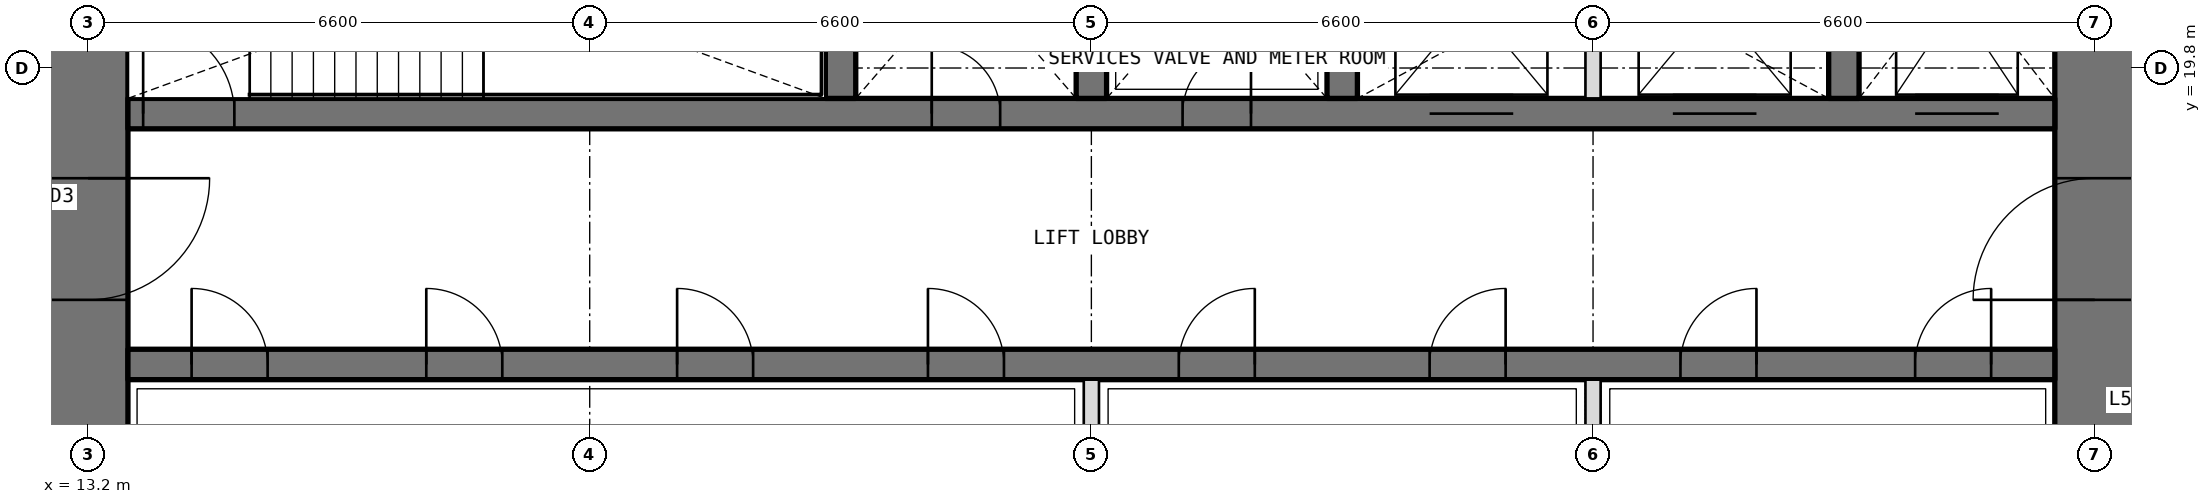
"""IFC4 building model, lengths in metres.
Left out: names, types, materials, properties, quantities, classifications, styles, units other than length and angle.
Written with IfcOpenShell. Run it as: python <this file> out.ifc"""

import sys

from ifc_helpers import new_model, si_unit, direction, frame, frame_2d, origin, place, context, subcontext, project, spatial, rectangle, extrude, element, fill, save


model = new_model("IFC4")
c1 = context("Model", 3, precision=1e-05, world=origin(), true_north=direction((0.0, 1.0)))
c2 = subcontext(c1, "Body", "Model", "MODEL_VIEW")
j1 = project(units=[si_unit("LENGTHUNIT", "METRE"), si_unit("PLANEANGLEUNIT", "RADIAN")], contexts=[c1])
p1 = place(None, origin())
s1 = spatial("IfcSite", under=j1, at=p1, CompositionType="ELEMENT")
p2 = place(p1, origin())
s2 = spatial("IfcBuilding", under=s1, at=p2, CompositionType="ELEMENT")
p3 = place(p2, frame((0.0, 0.0, 218.7)))
s3 = spatial("IfcBuildingStorey", under=s2, at=p3, CompositionType="ELEMENT", Elevation=218.7)
p4 = place(p3, frame((39.6, 13.725, 0.0), z_axis=(0.0, 0.0, 1.0), x_axis=(0.0, 1.0, 0.0)))
e1 = element("IfcWall", 1, at=p4, inside=s3, PredefinedType="SHEAR", context=c2, shape_type="SweptSolid", body=[
    extrude(rectangle(XDim=18.75, YDim=1.05, at=frame_2d((9.375, 0.0))), origin(), (0.0, 0.0, 1.0), 4.2),
])
p5 = place(p4, frame((3.025, 0.0, 0.0)))
e2 = element("IfcOpeningElement", 2, at=p5, cuts=e1, PredefinedType="OPENING", context=c2, shape_type="SweptSolid", body=[
    extrude(rectangle(XDim=1.6, YDim=2.1, at=frame_2d((0.8, 1.05))), frame((0.0, 0.535, 0.0), z_axis=(0.0, -1.0, 0.0), x_axis=(1.0, 0.0, 0.0)), (0.0, 0.0, 1.0), 1.07),
])
p6 = place(p4, frame((13.825, 0.0, 0.0)))
e3 = element("IfcOpeningElement", 3, at=p6, cuts=e1, PredefinedType="OPENING", context=c2, shape_type="SweptSolid", body=[
    extrude(rectangle(XDim=1.6, YDim=2.1, at=frame_2d((0.8, 1.05))), frame((0.0, 0.535, 0.0), z_axis=(0.0, -1.0, 0.0), x_axis=(1.0, 0.0, 0.0)), (0.0, 0.0, 1.0), 1.07),
])
p7 = place(p3, frame((13.2, 32.475, 0.0), z_axis=(0.0, 0.0, 1.0), x_axis=(0.0, -1.0, 0.0)))
e4 = element("IfcWall", 4, at=p7, inside=s3, PredefinedType="SHEAR", context=c2, shape_type="SweptSolid", body=[
    extrude(rectangle(XDim=18.75, YDim=1.05, at=frame_2d((9.375, 0.0))), origin(), (0.0, 0.0, 1.0), 4.2),
])
p8 = place(p7, frame((14.125, 0.0, 0.0)))
e5 = element("IfcOpeningElement", 5, at=p8, cuts=e4, PredefinedType="OPENING", context=c2, shape_type="SweptSolid", body=[
    extrude(rectangle(XDim=1.6, YDim=2.1, at=frame_2d((0.8, 1.05))), frame((0.0, 0.535, 0.0), z_axis=(0.0, -1.0, 0.0), x_axis=(1.0, 0.0, 0.0)), (0.0, 0.0, 1.0), 1.07),
])
p9 = place(p7, frame((3.325, 0.0, 0.0)))
e6 = element("IfcOpeningElement", 6, at=p9, cuts=e4, PredefinedType="OPENING", context=c2, shape_type="SweptSolid", body=[
    extrude(rectangle(XDim=1.6, YDim=2.1, at=frame_2d((0.8, 1.05))), frame((0.0, 0.535, 0.0), z_axis=(0.0, -1.0, 0.0), x_axis=(1.0, 0.0, 0.0)), (0.0, 0.0, 1.0), 1.07),
])
p10 = place(p3, frame((13.725, 15.9, 0.0), z_axis=(0.0, 0.0, 1.0), x_axis=(1.0, 0.0, 0.0)))
e7 = element("IfcWall", 7, at=p10, inside=s3, PredefinedType="SHEAR", context=c2, shape_type="SweptSolid", body=[
    extrude(rectangle(XDim=25.35, YDim=0.4, at=frame_2d((12.675, 0.0))), origin(), (0.0, 0.0, 1.0), 4.2),
])
p11 = place(p10, frame((0.837, 0.0, 0.0)))
e8 = element("IfcOpeningElement", 8, at=p11, cuts=e7, PredefinedType="OPENING", context=c2, shape_type="SweptSolid", body=[
    extrude(rectangle(XDim=1.0, YDim=2.1, at=frame_2d((0.5, 1.05))), frame((0.0, 0.21, 0.0), z_axis=(0.0, -1.0, 0.0), x_axis=(1.0, 0.0, 0.0)), (0.0, 0.0, 1.0), 0.42),
])
p12 = place(p10, frame((3.925, 0.0, 0.0)))
e9 = element("IfcOpeningElement", 9, at=p12, cuts=e7, PredefinedType="OPENING", context=c2, shape_type="SweptSolid", body=[
    extrude(rectangle(XDim=1.0, YDim=2.1, at=frame_2d((0.5, 1.05))), frame((0.0, 0.21, 0.0), z_axis=(0.0, -1.0, 0.0), x_axis=(1.0, 0.0, 0.0)), (0.0, 0.0, 1.0), 0.42),
])
p13 = place(p10, frame((7.225, 0.0, 0.0)))
e10 = element("IfcOpeningElement", 10, at=p13, cuts=e7, PredefinedType="OPENING", context=c2, shape_type="SweptSolid", body=[
    extrude(rectangle(XDim=1.0, YDim=2.1, at=frame_2d((0.5, 1.05))), frame((0.0, 0.21, 0.0), z_axis=(0.0, -1.0, 0.0), x_axis=(1.0, 0.0, 0.0)), (0.0, 0.0, 1.0), 0.42),
])
p14 = place(p10, frame((10.525, 0.0, 0.0)))
e11 = element("IfcOpeningElement", 11, at=p14, cuts=e7, PredefinedType="OPENING", context=c2, shape_type="SweptSolid", body=[
    extrude(rectangle(XDim=1.0, YDim=2.1, at=frame_2d((0.5, 1.05))), frame((0.0, 0.21, 0.0), z_axis=(0.0, -1.0, 0.0), x_axis=(1.0, 0.0, 0.0)), (0.0, 0.0, 1.0), 0.42),
])
p15 = place(p10, frame((13.825, 0.0, 0.0)))
e12 = element("IfcOpeningElement", 12, at=p15, cuts=e7, PredefinedType="OPENING", context=c2, shape_type="SweptSolid", body=[
    extrude(rectangle(XDim=1.0, YDim=2.1, at=frame_2d((0.5, 1.05))), frame((0.0, 0.21, 0.0), z_axis=(0.0, -1.0, 0.0), x_axis=(1.0, 0.0, 0.0)), (0.0, 0.0, 1.0), 0.42),
])
p16 = place(p10, frame((17.125, 0.0, 0.0)))
e13 = element("IfcOpeningElement", 13, at=p16, cuts=e7, PredefinedType="OPENING", context=c2, shape_type="SweptSolid", body=[
    extrude(rectangle(XDim=1.0, YDim=2.1, at=frame_2d((0.5, 1.05))), frame((0.0, 0.21, 0.0), z_axis=(0.0, -1.0, 0.0), x_axis=(1.0, 0.0, 0.0)), (0.0, 0.0, 1.0), 0.42),
])
p17 = place(p10, frame((20.425, 0.0, 0.0)))
e14 = element("IfcOpeningElement", 14, at=p17, cuts=e7, PredefinedType="OPENING", context=c2, shape_type="SweptSolid", body=[
    extrude(rectangle(XDim=1.0, YDim=2.1, at=frame_2d((0.5, 1.05))), frame((0.0, 0.21, 0.0), z_axis=(0.0, -1.0, 0.0), x_axis=(1.0, 0.0, 0.0)), (0.0, 0.0, 1.0), 0.42),
])
p18 = place(p10, frame((23.512, 0.0, 0.0)))
e15 = element("IfcOpeningElement", 15, at=p18, cuts=e7, PredefinedType="OPENING", context=c2, shape_type="SweptSolid", body=[
    extrude(rectangle(XDim=1.0, YDim=2.1, at=frame_2d((0.5, 1.05))), frame((0.0, 0.21, 0.0), z_axis=(0.0, -1.0, 0.0), x_axis=(1.0, 0.0, 0.0)), (0.0, 0.0, 1.0), 0.42),
])
p19 = place(p3, frame((13.725, 19.2, 0.0), z_axis=(0.0, 0.0, 1.0), x_axis=(1.0, 0.0, 0.0)))
e16 = element("IfcWall", 16, at=p19, inside=s3, PredefinedType="SHEAR", context=c2, shape_type="SweptSolid", body=[
    extrude(rectangle(XDim=25.35, YDim=0.4, at=frame_2d((12.675, 0.0))), origin(), (0.0, 0.0, 1.0), 4.2),
])
p20 = place(p19, frame((10.575, 0.0, 0.0)))
e17 = element("IfcOpeningElement", 17, at=p20, cuts=e16, PredefinedType="OPENING", context=c2, shape_type="SweptSolid", body=[
    extrude(rectangle(XDim=0.9, YDim=2.1, at=frame_2d((0.45, 1.05))), frame((0.0, 0.21, 0.0), z_axis=(0.0, -1.0, 0.0), x_axis=(1.0, 0.0, 0.0)), (0.0, 0.0, 1.0), 0.42),
])
p21 = place(p19, frame((13.875, 0.0, 0.0)))
e18 = element("IfcOpeningElement", 18, at=p21, cuts=e16, PredefinedType="OPENING", context=c2, shape_type="SweptSolid", body=[
    extrude(rectangle(XDim=0.9, YDim=2.1, at=frame_2d((0.45, 1.05))), frame((0.0, 0.21, 0.0), z_axis=(0.0, -1.0, 0.0), x_axis=(1.0, 0.0, 0.0)), (0.0, 0.0, 1.0), 0.42),
])
p22 = place(p19, frame((0.2, 0.0, 0.0)))
e19 = element("IfcOpeningElement", 19, at=p22, cuts=e16, PredefinedType="OPENING", context=c2, shape_type="SweptSolid", body=[
    extrude(rectangle(XDim=1.2, YDim=2.1, at=frame_2d((0.6, 1.05))), frame((0.0, 0.21, 0.0), z_axis=(0.0, -1.0, 0.0), x_axis=(1.0, 0.0, 0.0)), (0.0, 0.0, 1.0), 0.42),
])
p23 = place(p19, frame((23.512, 0.0, 0.0)))
e20 = element("IfcOpeningElement", 20, at=p23, cuts=e16, PredefinedType="OPENING", context=c2, shape_type="SweptSolid", body=[
    extrude(rectangle(XDim=1.1, YDim=2.1, at=frame_2d((0.55, 1.05))), frame((0.0, 0.21, 0.0), z_axis=(0.0, -1.0, 0.0), x_axis=(1.0, 0.0, 0.0)), (0.0, 0.0, 1.0), 0.42),
])
p24 = place(p19, frame((17.125, 0.0, 0.0)))
e21 = element("IfcOpeningElement", 21, at=p24, cuts=e16, PredefinedType="OPENING", context=c2, shape_type="SweptSolid", body=[
    extrude(rectangle(XDim=1.1, YDim=2.1, at=frame_2d((0.55, 1.05))), frame((0.0, 0.21, 0.0), z_axis=(0.0, -1.0, 0.0), x_axis=(1.0, 0.0, 0.0)), (0.0, 0.0, 1.0), 0.42),
])
p25 = place(p19, frame((20.325, 0.0, 0.0)))
e22 = element("IfcOpeningElement", 22, at=p25, cuts=e16, PredefinedType="OPENING", context=c2, shape_type="SweptSolid", body=[
    extrude(rectangle(XDim=1.1, YDim=2.1, at=frame_2d((0.55, 1.05))), frame((0.0, 0.21, 0.0), z_axis=(0.0, -1.0, 0.0), x_axis=(1.0, 0.0, 0.0)), (0.0, 0.0, 1.0), 0.42),
])
for number, where, z_axis, x_axis in (
    (23, (23.1, 19.4, 0.0), (0.0, 0.0, 1.0), (0.0, 1.0, 0.0)),
    (24, (26.4, 19.4, 0.0), (0.0, 0.0, 1.0), (0.0, 1.0, 0.0)),
    (25, (29.7, 19.4, 0.0), (0.0, 0.0, 1.0), (0.0, 1.0, 0.0)),
    (26, (36.3, 19.4, 0.0), (0.0, 0.0, 1.0), (0.0, 1.0, 0.0)),
):
    element("IfcWall", number, at=place(p3, frame(where, z_axis=z_axis, x_axis=x_axis)), inside=s3, PredefinedType="SHEAR", context=c2, shape_type="SweptSolid", body=[
        extrude(rectangle(XDim=3.35, YDim=0.4, at=frame_2d((1.675, 0.0))), origin(), (0.0, 0.0, 1.0), 4.2),
    ])
for number, where, z_axis, x_axis in (
    (27, (26.4, 13.725, 0.0), (0.0, 0.0, 1.0), (0.0, 1.0, 0.0)),
    (28, (33.0, 13.725, 0.0), (0.0, 0.0, 1.0), (0.0, 1.0, 0.0)),
):
    element("IfcWall", number, at=place(p3, frame(where, z_axis=z_axis, x_axis=x_axis)), inside=s3, PredefinedType="PARTITIONING", context=c2, shape_type="SweptSolid", body=[
        extrude(rectangle(XDim=1.975, YDim=0.2, at=frame_2d((0.987, 0.0))), origin(), (0.0, 0.0, 1.0), 4.2),
    ])
p26 = place(p3, frame((33.0, 19.4, 0.0), z_axis=(0.0, 0.0, 1.0), x_axis=(0.0, 1.0, 0.0)))
e29 = element("IfcWall", 29, at=p26, inside=s3, PredefinedType="PARTITIONING", context=c2, shape_type="SweptSolid", body=[
    extrude(rectangle(XDim=3.35, YDim=0.2, at=frame_2d((1.675, 0.0))), origin(), (0.0, 0.0, 1.0), 4.2),
])
p27 = place(p20, origin())
e30 = element("IfcDoor", 30, at=p27, inside=s3, OperationType="SINGLE_SWING_LEFT", PredefinedType="DOOR", context=c2, shape_type="SweptSolid", body=[
    extrude(rectangle(XDim=0.9, YDim=2.1, at=frame_2d((0.45, 1.05))), frame((0.0, 0.025, 0.0), z_axis=(0.0, -1.0, 0.0), x_axis=(1.0, 0.0, 0.0)), (0.0, 0.0, 1.0), 0.05),
])
fill(e17, e30)
p28 = place(p21, origin())
e31 = element("IfcDoor", 31, at=p28, inside=s3, OperationType="SINGLE_SWING_RIGHT", PredefinedType="DOOR", context=c2, shape_type="SweptSolid", body=[
    extrude(rectangle(XDim=0.9, YDim=2.1, at=frame_2d((0.45, 1.05))), frame((0.0, 0.025, 0.0), z_axis=(0.0, -1.0, 0.0), x_axis=(1.0, 0.0, 0.0)), (0.0, 0.0, 1.0), 0.05),
])
fill(e18, e31)
p29 = place(p11, origin())
e32 = element("IfcDoor", 32, at=p29, inside=s3, OperationType="SINGLE_SWING_LEFT", PredefinedType="DOOR", context=c2, shape_type="SweptSolid", body=[
    extrude(rectangle(XDim=1.0, YDim=2.1, at=frame_2d((0.5, 1.05))), frame((0.0, 0.025, 0.0), z_axis=(0.0, -1.0, 0.0), x_axis=(1.0, 0.0, 0.0)), (0.0, 0.0, 1.0), 0.05),
])
fill(e8, e32)
p30 = place(p12, origin())
e33 = element("IfcDoor", 33, at=p30, inside=s3, OperationType="SINGLE_SWING_LEFT", PredefinedType="DOOR", context=c2, shape_type="SweptSolid", body=[
    extrude(rectangle(XDim=1.0, YDim=2.1, at=frame_2d((0.5, 1.05))), frame((0.0, 0.025, 0.0), z_axis=(0.0, -1.0, 0.0), x_axis=(1.0, 0.0, 0.0)), (0.0, 0.0, 1.0), 0.05),
])
fill(e9, e33)
p31 = place(p13, origin())
e34 = element("IfcDoor", 34, at=p31, inside=s3, OperationType="SINGLE_SWING_LEFT", PredefinedType="DOOR", context=c2, shape_type="SweptSolid", body=[
    extrude(rectangle(XDim=1.0, YDim=2.1, at=frame_2d((0.5, 1.05))), frame((0.0, 0.025, 0.0), z_axis=(0.0, -1.0, 0.0), x_axis=(1.0, 0.0, 0.0)), (0.0, 0.0, 1.0), 0.05),
])
fill(e10, e34)
p32 = place(p14, origin())
e35 = element("IfcDoor", 35, at=p32, inside=s3, OperationType="SINGLE_SWING_LEFT", PredefinedType="DOOR", context=c2, shape_type="SweptSolid", body=[
    extrude(rectangle(XDim=1.0, YDim=2.1, at=frame_2d((0.5, 1.05))), frame((0.0, 0.025, 0.0), z_axis=(0.0, -1.0, 0.0), x_axis=(1.0, 0.0, 0.0)), (0.0, 0.0, 1.0), 0.05),
])
fill(e11, e35)
p33 = place(p15, origin())
e36 = element("IfcDoor", 36, at=p33, inside=s3, OperationType="SINGLE_SWING_RIGHT", PredefinedType="DOOR", context=c2, shape_type="SweptSolid", body=[
    extrude(rectangle(XDim=1.0, YDim=2.1, at=frame_2d((0.5, 1.05))), frame((0.0, 0.025, 0.0), z_axis=(0.0, -1.0, 0.0), x_axis=(1.0, 0.0, 0.0)), (0.0, 0.0, 1.0), 0.05),
])
fill(e12, e36)
p34 = place(p16, origin())
e37 = element("IfcDoor", 37, at=p34, inside=s3, OperationType="SINGLE_SWING_RIGHT", PredefinedType="DOOR", context=c2, shape_type="SweptSolid", body=[
    extrude(rectangle(XDim=1.0, YDim=2.1, at=frame_2d((0.5, 1.05))), frame((0.0, 0.025, 0.0), z_axis=(0.0, -1.0, 0.0), x_axis=(1.0, 0.0, 0.0)), (0.0, 0.0, 1.0), 0.05),
])
fill(e13, e37)
p35 = place(p17, origin())
e38 = element("IfcDoor", 38, at=p35, inside=s3, OperationType="SINGLE_SWING_RIGHT", PredefinedType="DOOR", context=c2, shape_type="SweptSolid", body=[
    extrude(rectangle(XDim=1.0, YDim=2.1, at=frame_2d((0.5, 1.05))), frame((0.0, 0.025, 0.0), z_axis=(0.0, -1.0, 0.0), x_axis=(1.0, 0.0, 0.0)), (0.0, 0.0, 1.0), 0.05),
])
fill(e14, e38)
p36 = place(p18, origin())
e39 = element("IfcDoor", 39, at=p36, inside=s3, OperationType="SINGLE_SWING_RIGHT", PredefinedType="DOOR", context=c2, shape_type="SweptSolid", body=[
    extrude(rectangle(XDim=1.0, YDim=2.1, at=frame_2d((0.5, 1.05))), frame((0.0, 0.025, 0.0), z_axis=(0.0, -1.0, 0.0), x_axis=(1.0, 0.0, 0.0)), (0.0, 0.0, 1.0), 0.05),
])
fill(e15, e39)
p37 = place(p22, origin())
e40 = element("IfcDoor", 40, at=p37, inside=s3, OperationType="SINGLE_SWING_LEFT", PredefinedType="DOOR", context=c2, shape_type="SweptSolid", body=[
    extrude(rectangle(XDim=1.2, YDim=2.1, at=frame_2d((0.6, 1.05))), frame((0.0, 0.025, 0.0), z_axis=(0.0, -1.0, 0.0), x_axis=(1.0, 0.0, 0.0)), (0.0, 0.0, 1.0), 0.05),
])
fill(e19, e40)
p38 = place(p8, origin())
e41 = element("IfcDoor", 41, at=p38, inside=s3, OperationType="DOUBLE_DOOR_DOUBLE_SWING", PredefinedType="DOOR", context=c2, shape_type="SweptSolid", body=[
    extrude(rectangle(XDim=1.6, YDim=2.1, at=frame_2d((0.8, 1.05))), frame((0.0, 0.025, 0.0), z_axis=(0.0, -1.0, 0.0), x_axis=(1.0, 0.0, 0.0)), (0.0, 0.0, 1.0), 0.05),
])
fill(e5, e41)
p39 = place(p5, origin())
e42 = element("IfcDoor", 42, at=p39, inside=s3, OperationType="DOUBLE_DOOR_DOUBLE_SWING", PredefinedType="DOOR", context=c2, shape_type="SweptSolid", body=[
    extrude(rectangle(XDim=1.6, YDim=2.1, at=frame_2d((0.8, 1.05))), frame((0.0, 0.025, 0.0), z_axis=(0.0, -1.0, 0.0), x_axis=(1.0, 0.0, 0.0)), (0.0, 0.0, 1.0), 0.05),
])
fill(e2, e42)
p40 = place(p23, origin())
e43 = element("IfcDoor", 43, at=p40, inside=s3, OperationType="DOUBLE_DOOR_SLIDING", PredefinedType="DOOR", context=c2, shape_type="SweptSolid", body=[
    extrude(rectangle(XDim=1.1, YDim=2.1, at=frame_2d((0.55, 1.05))), frame((0.0, 0.025, 0.0), z_axis=(0.0, -1.0, 0.0), x_axis=(1.0, 0.0, 0.0)), (0.0, 0.0, 1.0), 0.05),
])
fill(e20, e43)
p41 = place(p24, origin())
e44 = element("IfcDoor", 44, at=p41, inside=s3, OperationType="DOUBLE_DOOR_SLIDING", PredefinedType="DOOR", context=c2, shape_type="SweptSolid", body=[
    extrude(rectangle(XDim=1.1, YDim=2.1, at=frame_2d((0.55, 1.05))), frame((0.0, 0.025, 0.0), z_axis=(0.0, -1.0, 0.0), x_axis=(1.0, 0.0, 0.0)), (0.0, 0.0, 1.0), 0.05),
])
fill(e21, e44)
p42 = place(p25, origin())
e45 = element("IfcDoor", 45, at=p42, inside=s3, OperationType="DOUBLE_DOOR_SLIDING", PredefinedType="DOOR", context=c2, shape_type="SweptSolid", body=[
    extrude(rectangle(XDim=1.1, YDim=2.1, at=frame_2d((0.55, 1.05))), frame((0.0, 0.025, 0.0), z_axis=(0.0, -1.0, 0.0), x_axis=(1.0, 0.0, 0.0)), (0.0, 0.0, 1.0), 0.05),
])
fill(e22, e45)
save(model, sys.argv[1])
